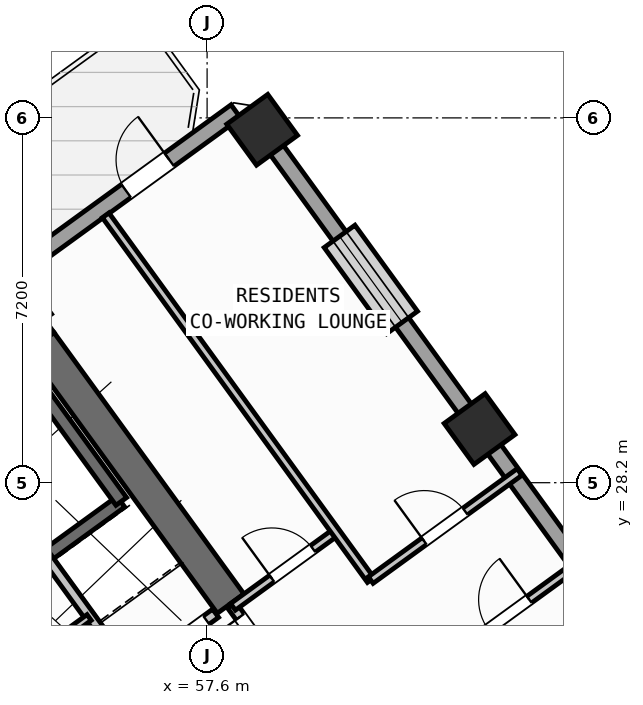
"""IFC4 building model, lengths in metres.
Left out: names, types, materials, properties, quantities, classifications, styles, units other than length and angle.
Written with IfcOpenShell. Run it as: python <this file> out.ifc"""

import sys

from ifc_helpers import new_model, si_unit, direction, frame, frame_2d, origin, origin_2d, place, context, subcontext, project, spatial, rectangle, hollow_rectangle, extrude, source, transform, mapped, element, fill, save


model = new_model("IFC4")
c1 = context("Model", 3, precision=1e-05, world=origin(), true_north=direction((0.0, 1.0)))
c2 = subcontext(c1, "Body", "Model", "MODEL_VIEW")
j1 = project(units=[si_unit("LENGTHUNIT", "METRE"), si_unit("PLANEANGLEUNIT", "RADIAN")], contexts=[c1])
p1 = place(None, origin())
s1 = spatial("IfcSite", under=j1, at=p1, CompositionType="ELEMENT")
p2 = place(p1, origin())
s2 = spatial("IfcBuilding", under=s1, at=p2, CompositionType="ELEMENT")
p3 = place(p2, frame((0.0, 0.0, 31.2)))
s3 = spatial("IfcBuildingStorey", under=s2, at=p3, CompositionType="ELEMENT", Elevation=31.2)
p4 = place(p3, frame((44.325, 24.113, 0.0), z_axis=(0.0, 0.0, 1.0), x_axis=(0.809012664862, 0.58779121131, 0.0)))
e1 = element("IfcWall", 1, at=p4, inside=s3, PredefinedType="SHEAR", context=c2, shape_type="SweptSolid", body=[
    extrude(rectangle(XDim=12.44, YDim=0.65, at=frame_2d((6.22, 0.0))), origin(), (0.0, 0.0, 1.0), 3.35),
])
p5 = place(p3, frame((58.064, 25.813, 0.0), z_axis=(0.0, 0.0, 1.0), x_axis=(-0.58777996584, 0.809020835181, 0.0)))
e2 = element("IfcWall", 2, at=p5, inside=s3, PredefinedType="SHEAR", context=c2, shape_type="SweptSolid", body=[
    extrude(rectangle(XDim=6.375, YDim=0.65, at=frame_2d((3.188, 0.0))), origin(), (0.0, 0.0, 1.0), 3.35),
])
m1 = source(origin(), c2, "Body", "SweptSolid", [
    extrude(hollow_rectangle(XDim=1.0, YDim=1.0, WallThickness=0.04, at=origin_2d()), origin(), (0.0, 0.0, 1.0), 3.6),
])
for number, where, z_axis, x_axis in (
    (3, (62.977, 29.259, 0.0), (0.0, 0.0, 1.0), (0.809, 0.588, 0.0)),
    (4, (58.686, 35.165, 0.0), (0.0, 0.0, 1.0), (0.809, 0.588, 0.0)),
):
    element("IfcColumn", number, at=place(p3, frame(where, z_axis=z_axis, x_axis=x_axis)), inside=s3, PredefinedType="COLUMN", context=c2, shape_type="MappedRepresentation", body=[
        mapped(m1, transform((0.0, 0.0, 0.0), scale=1.0)),
    ])
p6 = place(p3, frame((43.938, 25.192, 0.0), z_axis=(0.0, 0.0, 1.0), x_axis=(0.809016324578, 0.587786174187, 0.0)))
e5 = element("IfcWall", 5, at=p6, inside=s3, PredefinedType="STANDARD", context=c2, shape_type="SweptSolid", body=[
    extrude(rectangle(XDim=17.587, YDim=0.32, at=frame_2d((8.794, 0.0))), origin(), (0.0, 0.0, 1.0), 3.35),
])
p7 = place(p6, frame((14.914, 0.0, 0.0)))
e6 = element("IfcOpeningElement", 6, at=p7, cuts=e5, PredefinedType="OPENING", context=c2, shape_type="SweptSolid", body=[
    extrude(rectangle(XDim=1.05, YDim=2.15, at=frame_2d((0.525, 1.075))), frame((0.0, 0.17, 0.0), z_axis=(0.0, -1.0, 0.0), x_axis=(1.0, 0.0, 0.0)), (0.0, 0.0, 1.0), 0.34),
])
p8 = place(p6, frame((2.169, 0.0, 0.8)))
e7 = element("IfcOpeningElement", 7, at=p8, cuts=e5, PredefinedType="OPENING", context=c2, shape_type="SweptSolid", body=[
    extrude(rectangle(XDim=2.1, YDim=1.55, at=frame_2d((1.05, 0.775))), frame((0.0, 0.17, 0.0), z_axis=(0.0, -1.0, 0.0), x_axis=(1.0, 0.0, 0.0)), (0.0, 0.0, 1.0), 0.34),
])
p9 = place(p6, frame((7.319, 0.0, 0.8)))
e8 = element("IfcOpeningElement", 8, at=p9, cuts=e5, PredefinedType="OPENING", context=c2, shape_type="SweptSolid", body=[
    extrude(rectangle(XDim=2.1, YDim=1.55, at=frame_2d((1.05, 0.775))), frame((0.0, 0.17, 0.0), z_axis=(0.0, -1.0, 0.0), x_axis=(1.0, 0.0, 0.0)), (0.0, 0.0, 1.0), 0.34),
])
p10 = place(p3, frame((58.455, 35.484, 0.0), z_axis=(0.0, 0.0, 1.0), x_axis=(0.587783625747, -0.809018176127, 0.0)))
e9 = element("IfcWall", 9, at=p10, inside=s3, PredefinedType="STANDARD", context=c2, shape_type="SweptSolid", body=[
    extrude(rectangle(XDim=21.587, YDim=0.32, at=frame_2d((10.794, 0.0))), origin(), (0.0, 0.0, 1.0), 2.725),
])
p11 = place(p10, frame((2.994, 0.0, 0.8)))
e10 = element("IfcOpeningElement", 10, at=p11, cuts=e9, PredefinedType="OPENING", context=c2, shape_type="SweptSolid", body=[
    extrude(rectangle(XDim=2.1, YDim=1.55, at=frame_2d((1.05, 0.775))), frame((0.0, 0.17, 0.0), z_axis=(0.0, -1.0, 0.0), x_axis=(1.0, 0.0, 0.0)), (0.0, 0.0, 1.0), 0.34),
])
p12 = place(p10, frame((11.934, 0.0, 0.85)))
e11 = element("IfcOpeningElement", 11, at=p12, cuts=e9, PredefinedType="OPENING", context=c2, shape_type="SweptSolid", body=[
    extrude(rectangle(XDim=1.8, YDim=1.5, at=frame_2d((0.9, 0.75))), frame((0.0, 0.17, 0.0), z_axis=(0.0, -1.0, 0.0), x_axis=(1.0, 0.0, 0.0)), (0.0, 0.0, 1.0), 0.34),
])
p13 = place(p10, frame((18.535, 0.0, 0.85)))
e12 = element("IfcOpeningElement", 12, at=p13, cuts=e9, PredefinedType="OPENING", context=c2, shape_type="SweptSolid", body=[
    extrude(rectangle(XDim=1.5, YDim=1.5, at=frame_2d((0.75, 0.75))), frame((0.0, 0.17, 0.0), z_axis=(0.0, -1.0, 0.0), x_axis=(1.0, 0.0, 0.0)), (0.0, 0.0, 1.0), 0.34),
])
p14 = place(p3, frame((49.863, 23.44, 0.0), z_axis=(0.0, 0.0, 1.0), x_axis=(0.809003474932, 0.587803859759, 0.0)))
e13 = element("IfcWall", 13, at=p14, inside=s3, PredefinedType="SHEAR", context=c2, shape_type="SweptSolid", body=[
    extrude(rectangle(XDim=7.46, YDim=0.26, at=frame_2d((3.73, 0.0))), origin(), (0.0, 0.0, 1.0), 3.35),
])
p15 = place(p14, frame((0.36, 0.0, 0.0)))
e14 = element("IfcOpeningElement", 14, at=p15, cuts=e13, PredefinedType="OPENING", context=c2, shape_type="SweptSolid", body=[
    extrude(rectangle(XDim=0.86, YDim=2.05, at=frame_2d((0.43, 1.025))), frame((0.0, 0.14, 0.0), z_axis=(0.0, -1.0, 0.0), x_axis=(1.0, 0.0, 0.0)), (0.0, 0.0, 1.0), 0.28),
])
p16 = place(p3, frame((55.906, 27.831, 0.0), z_axis=(0.0, 0.0, 1.0), x_axis=(-0.587804123638, 0.809003283204, 0.0)))
e15 = element("IfcWall", 15, at=p16, inside=s3, PredefinedType="SHEAR", context=c2, shape_type="SweptSolid", body=[
    extrude(rectangle(XDim=3.16, YDim=0.26, at=frame_2d((1.58, 0.0))), origin(), (0.0, 0.0, 1.0), 3.35),
])
p17 = place(p3, frame((56.111, 24.419, 0.0), z_axis=(0.0, 0.0, 1.0), x_axis=(-0.58777848983, 0.809021907548, 0.0)))
e16 = element("IfcWall", 16, at=p17, inside=s3, PredefinedType="STANDARD", context=c2, shape_type="SweptSolid", body=[
    extrude(rectangle(XDim=2.88, YDim=0.2, at=frame_2d((1.44, 0.0))), origin(), (0.0, 0.0, 1.0), 3.34),
])
p18 = place(p3, frame((53.425, 22.468, 0.0), z_axis=(0.0, 0.0, 1.0), x_axis=(0.80902705128, 0.587771409902, 0.0)))
e17 = element("IfcWall", 17, at=p18, inside=s3, PredefinedType="STANDARD", context=c2, shape_type="SweptSolid", body=[
    extrude(rectangle(XDim=5.368, YDim=0.2, at=frame_2d((2.684, 0.0))), origin(), (0.0, 0.0, 1.0), 3.34),
])
p19 = place(p18, frame((4.28, 0.0, 0.0)))
e18 = element("IfcOpeningElement", 18, at=p19, cuts=e17, PredefinedType="OPENING", context=c2, shape_type="SweptSolid", body=[
    extrude(rectangle(XDim=0.86, YDim=2.05, at=frame_2d((0.43, 1.025))), frame((0.0, 0.11, 0.0), z_axis=(0.0, -1.0, 0.0), x_axis=(1.0, 0.0, 0.0)), (0.0, 0.0, 1.0), 0.22),
])
p20 = place(p18, frame((1.45, 0.0, 0.0)))
e19 = element("IfcOpeningElement", 19, at=p20, cuts=e17, PredefinedType="OPENING", context=c2, shape_type="SweptSolid", body=[
    extrude(rectangle(XDim=0.86, YDim=2.05, at=frame_2d((0.43, 1.025))), frame((0.0, 0.11, 0.0), z_axis=(0.0, -1.0, 0.0), x_axis=(1.0, 0.0, 0.0)), (0.0, 0.0, 1.0), 0.22),
])
p21 = place(p3, frame((52.618, 23.612, 0.0), z_axis=(0.0, 0.0, 1.0), x_axis=(0.809009587469, 0.587795446889, 0.0)))
e20 = element("IfcWall", 20, at=p21, inside=s3, PredefinedType="PLUMBINGWALL", context=c2, shape_type="SweptSolid", body=[
    extrude(rectangle(XDim=3.28, YDim=0.14, at=frame_2d((1.64, 0.0))), origin(), (0.0, 0.0, 1.0), 3.34),
])
p22 = place(p21, frame((1.2, 0.0, 0.0)))
e21 = element("IfcOpeningElement", 21, at=p22, cuts=e20, PredefinedType="OPENING", context=c2, shape_type="SweptSolid", body=[
    extrude(rectangle(XDim=0.78, YDim=2.05, at=frame_2d((0.39, 1.025))), frame((0.0, 0.08, 0.0), z_axis=(0.0, -1.0, 0.0), x_axis=(1.0, 0.0, 0.0)), (0.0, 0.0, 1.0), 0.16),
])
p23 = place(p3, frame((59.827, 23.386, 0.0), z_axis=(0.0, 0.0, 1.0), x_axis=(-0.587803840107, 0.809003489211, 0.0)))
e22 = element("IfcWall", 22, at=p23, inside=s3, PredefinedType="STANDARD", context=c2, shape_type="SweptSolid", body=[
    extrude(rectangle(XDim=2.96, YDim=0.2, at=frame_2d((1.48, 0.0))), origin(), (0.0, 0.0, 1.0), 3.34),
])
p24 = place(p23, frame((1.68, 0.0, 0.0)))
e23 = element("IfcOpeningElement", 23, at=p24, cuts=e22, PredefinedType="OPENING", context=c2, shape_type="SweptSolid", body=[
    extrude(rectangle(XDim=1.0, YDim=2.1, at=frame_2d((0.5, 1.05))), frame((0.0, 0.11, 0.0), z_axis=(0.0, -1.0, 0.0), x_axis=(1.0, 0.0, 0.0)), (0.0, 0.0, 1.0), 0.22),
])
p25 = place(p3, frame((58.111, 25.749, 0.0), z_axis=(0.0, 0.0, 1.0), x_axis=(0.809000999347, 0.58780726693, 0.0)))
e24 = element("IfcWall", 24, at=p25, inside=s3, PredefinedType="PARTITIONING", context=c2, shape_type="SweptSolid", body=[
    extrude(rectangle(XDim=2.51, YDim=0.16, at=frame_2d((1.255, 0.0))), origin(), (0.0, 0.0, 1.0), 2.725),
])
p26 = place(p25, frame((0.95, 0.0, 0.0)))
e25 = element("IfcOpeningElement", 25, at=p26, cuts=e24, PredefinedType="OPENING", context=c2, shape_type="SweptSolid", body=[
    extrude(rectangle(XDim=1.0, YDim=2.1, at=frame_2d((0.5, 1.05))), frame((0.0, 0.09, 0.0), z_axis=(0.0, -1.0, 0.0), x_axis=(1.0, 0.0, 0.0)), (0.0, 0.0, 1.0), 0.18),
])
p27 = place(p3, frame((60.829, 26.278, 0.0), z_axis=(0.0, 0.0, 1.0), x_axis=(-0.587781800813, 0.80901950201, 0.0)))
e26 = element("IfcWall", 26, at=p27, inside=s3, PredefinedType="PARTITIONING", context=c2, shape_type="SweptSolid", body=[
    extrude(rectangle(XDim=8.9, YDim=0.16, at=frame_2d((4.45, 0.0))), origin(), (0.0, 0.0, 1.0), 3.34),
])
p28 = place(p3, frame((62.093, 24.538, 0.0), z_axis=(0.0, 0.0, 1.0), x_axis=(0.809035546126, 0.58775971715, 0.0)))
e27 = element("IfcWall", 27, at=p28, inside=s3, PredefinedType="PARTITIONING", context=c2, shape_type="SweptSolid", body=[
    extrude(rectangle(XDim=3.63, YDim=0.16, at=frame_2d((1.815, 0.0))), origin(), (0.0, 0.0, 1.0), 3.34),
])
p29 = place(p28, frame((1.305, 0.0, 0.0)))
e28 = element("IfcOpeningElement", 28, at=p29, cuts=e27, PredefinedType="OPENING", context=c2, shape_type="SweptSolid", body=[
    extrude(rectangle(XDim=1.0, YDim=2.1, at=frame_2d((0.5, 1.05))), frame((0.0, 0.09, 0.0), z_axis=(0.0, -1.0, 0.0), x_axis=(1.0, 0.0, 0.0)), (0.0, 0.0, 1.0), 0.18),
])
p30 = place(p3, frame((60.829, 26.278, 0.0), z_axis=(0.0, 0.0, 1.0), x_axis=(0.809003564202, 0.587803736896, 0.0)))
e29 = element("IfcWall", 29, at=p30, inside=s3, PredefinedType="PARTITIONING", context=c2, shape_type="SweptSolid", body=[
    extrude(rectangle(XDim=3.63, YDim=0.16, at=frame_2d((1.815, 0.0))), origin(), (0.0, 0.0, 1.0), 3.34),
])
p31 = place(p30, frame((1.305, 0.0, 0.0)))
e30 = element("IfcOpeningElement", 30, at=p31, cuts=e29, PredefinedType="OPENING", context=c2, shape_type="SweptSolid", body=[
    extrude(rectangle(XDim=1.0, YDim=2.1, at=frame_2d((0.5, 1.05))), frame((0.0, 0.09, 0.0), z_axis=(0.0, -1.0, 0.0), x_axis=(1.0, 0.0, 0.0)), (0.0, 0.0, 1.0), 0.18),
])
m2 = source(origin(), c2, "Body", "SweptSolid", [
    extrude(rectangle(XDim=1.05, YDim=2.15, at=frame_2d((0.525, 1.075))), frame((0.0, 0.025, 0.0), z_axis=(0.0, -1.0, 0.0), x_axis=(1.0, 0.0, 0.0)), (0.0, 0.0, 1.0), 0.05),
])
p32 = place(p7, origin())
e31 = element("IfcDoor", 31, at=p32, inside=s3, OperationType="SINGLE_SWING_RIGHT", PredefinedType="DOOR", context=c2, shape_type="MappedRepresentation", body=[
    mapped(m2, transform((0.0, 0.0, 0.0), scale=1.0)),
])
fill(e6, e31)
m3 = source(origin(), c2, "Body", "SweptSolid", [
    extrude(rectangle(XDim=2.1, YDim=1.55, at=frame_2d((1.05, 0.775))), frame((0.0, 0.03, 0.0), z_axis=(0.0, -1.0, 0.0), x_axis=(1.0, 0.0, 0.0)), (0.0, 0.0, 1.0), 0.06),
])
p33 = place(p11, origin())
e32 = element("IfcWindow", 32, at=p33, inside=s3, PartitioningType="SINGLE_PANEL", PredefinedType="WINDOW", context=c2, shape_type="MappedRepresentation", body=[
    mapped(m3, transform((0.0, 0.0, 0.0), scale=1.0)),
])
fill(e10, e32)
m4 = source(origin(), c2, "Body", "SweptSolid", [
    extrude(rectangle(XDim=0.86, YDim=2.05, at=frame_2d((0.43, 1.025))), frame((0.0, 0.025, 0.0), z_axis=(0.0, -1.0, 0.0), x_axis=(1.0, 0.0, 0.0)), (0.0, 0.0, 1.0), 0.05),
])
p34 = place(p19, frame((0.86, 0.0, 0.0), z_axis=(0.0, 0.0, 1.0), x_axis=(-1.0, 0.0, 0.0)))
e33 = element("IfcDoor", 33, at=p34, inside=s3, OperationType="SINGLE_SWING_RIGHT", PredefinedType="DOOR", context=c2, shape_type="MappedRepresentation", body=[
    mapped(m4, transform((0.0, 0.0, 0.0), scale=1.0)),
])
fill(e18, e33)
m5 = source(origin(), c2, "Body", "SweptSolid", [
    extrude(rectangle(XDim=1.0, YDim=2.1, at=frame_2d((0.5, 1.05))), frame((0.0, 0.025, 0.0), z_axis=(0.0, -1.0, 0.0), x_axis=(1.0, 0.0, 0.0)), (0.0, 0.0, 1.0), 0.05),
])
p35 = place(p26, origin())
e34 = element("IfcDoor", 34, at=p35, inside=s3, OperationType="SINGLE_SWING_LEFT", PredefinedType="DOOR", context=c2, shape_type="MappedRepresentation", body=[
    mapped(m5, transform((0.0, 0.0, 0.0), scale=1.0)),
])
fill(e25, e34)
p36 = place(p24, origin())
e35 = element("IfcDoor", 35, at=p36, inside=s3, OperationType="SINGLE_SWING_RIGHT", PredefinedType="DOOR", context=c2, shape_type="MappedRepresentation", body=[
    mapped(m5, transform((0.0, 0.0, 0.0), scale=1.0)),
])
fill(e23, e35)
p37 = place(p31, origin())
e36 = element("IfcDoor", 36, at=p37, inside=s3, OperationType="SINGLE_SWING_LEFT", PredefinedType="DOOR", context=c2, shape_type="MappedRepresentation", body=[
    mapped(m5, transform((0.0, 0.0, 0.0), scale=1.0)),
])
fill(e30, e36)
p38 = place(p29, origin())
e37 = element("IfcDoor", 37, at=p38, inside=s3, OperationType="SINGLE_SWING_RIGHT", PredefinedType="DOOR", context=c2, shape_type="MappedRepresentation", body=[
    mapped(m5, transform((0.0, 0.0, 0.0), scale=1.0)),
])
fill(e28, e37)
save(model, sys.argv[1])
